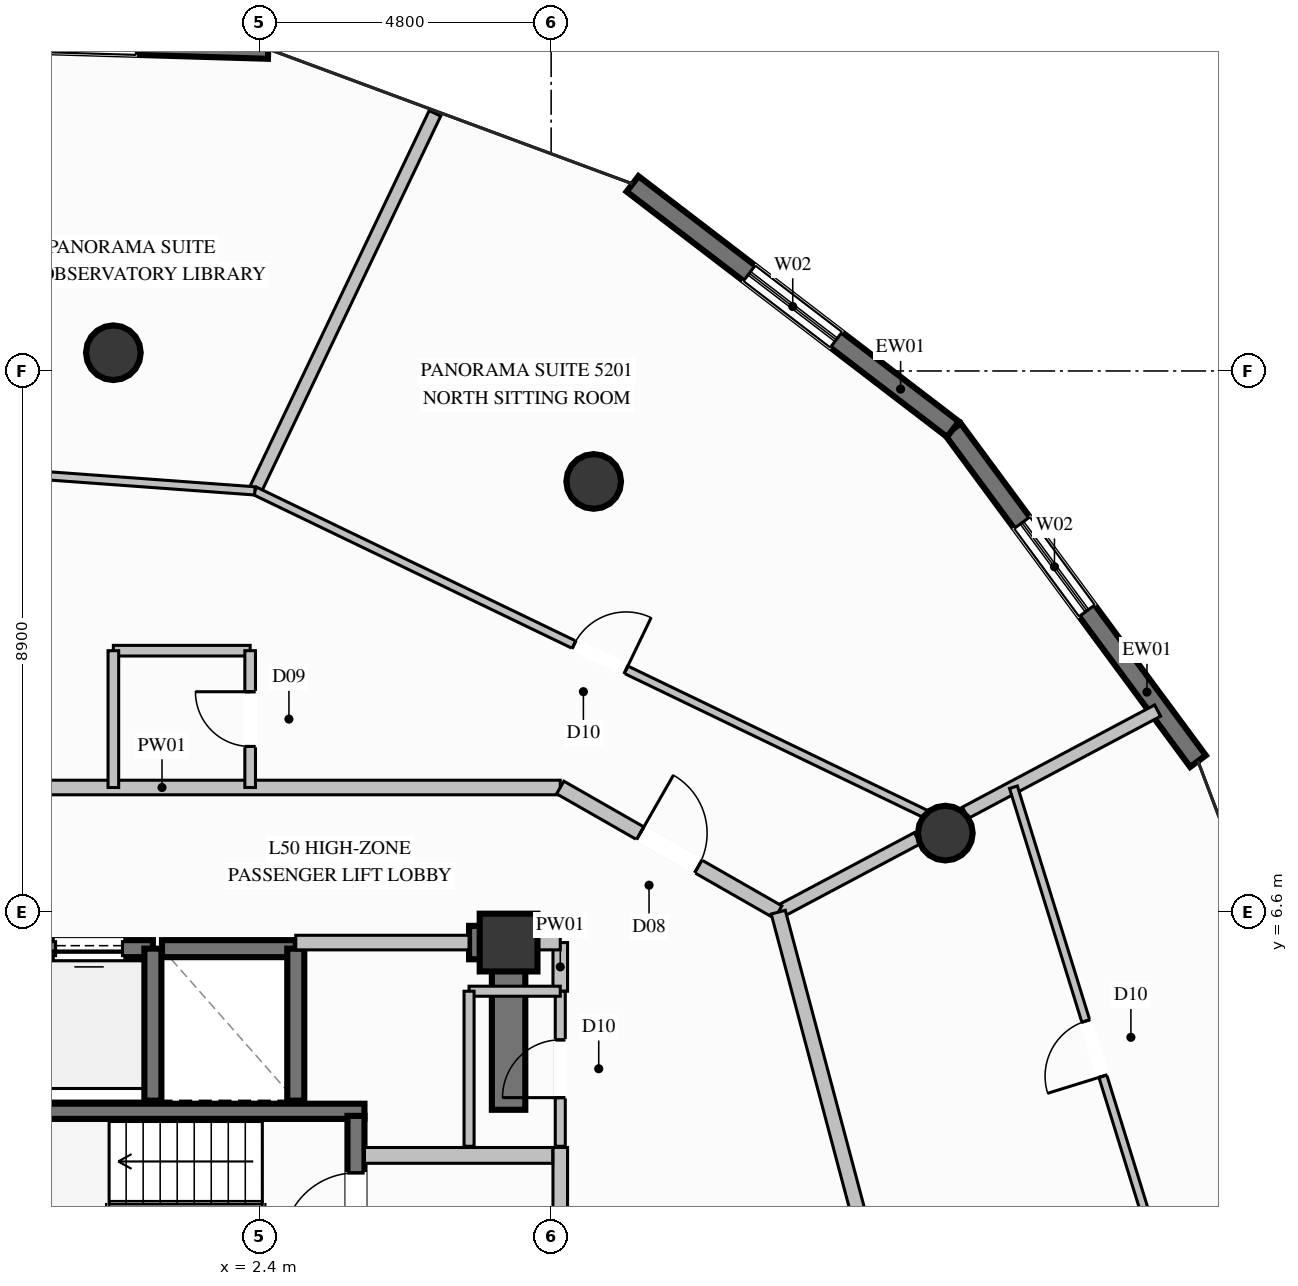
"""IFC4 building model, lengths in metres.
Left out: names, types, materials, properties, quantities, classifications, styles, units other than length and angle.
Written with IfcOpenShell. Run it as: python <this file> out.ifc"""

import sys

from ifc_helpers import new_model, si_unit, direction, frame, frame_2d, origin, origin_2d, place, context, subcontext, project, spatial, rectangle, circle, extrude, element, fill, save


model = new_model("IFC4")
c1 = context("Model", 3, precision=1e-05, world=origin(), true_north=direction((0.0, 1.0)))
c2 = subcontext(c1, "Body", "Model", "MODEL_VIEW")
j1 = project(units=[si_unit("LENGTHUNIT", "METRE"), si_unit("PLANEANGLEUNIT", "RADIAN")], contexts=[c1])
p1 = place(None, origin())
s1 = spatial("IfcSite", under=j1, at=p1, CompositionType="ELEMENT")
p2 = place(p1, origin())
s2 = spatial("IfcBuilding", under=s1, at=p2, CompositionType="ELEMENT")
p3 = place(p2, frame((0.0, 0.0, 194.8)))
s3 = spatial("IfcBuildingStorey", under=s2, at=p3, CompositionType="ELEMENT", Elevation=194.8)
p4 = place(p3, frame((6.5, 6.1, 0.0), z_axis=(0.0, 0.0, 1.0), x_axis=(1.0, 0.0, 0.0)))
e1 = element("IfcColumn", 1, at=p4, inside=s3, PredefinedType="COLUMN", context=c2, shape_type="SweptSolid", body=[
    extrude(rectangle(XDim=0.95, YDim=0.95, at=origin_2d()), origin(), (0.0, 0.0, 1.0), 3.6),
])
p5 = place(p3, frame((-4.13, 3.325, 0.0), z_axis=(0.0, 0.0, 1.0), x_axis=(1.0, 0.0, 0.0)))
e2 = element("IfcWall", 2, at=p5, inside=s3, PredefinedType="SOLIDWALL", context=c2, shape_type="SweptSolid", body=[
    extrude(rectangle(XDim=8.26, YDim=0.25, at=frame_2d((4.13, 0.0))), origin(), (0.0, 0.0, 1.0), 3.6),
])
p6 = place(p3, frame((5.85, 6.1, 0.0), z_axis=(0.0, 0.0, 1.0), x_axis=(1.0, 0.0, 0.0)))
e3 = element("IfcWall", 3, at=p6, inside=s3, PredefinedType="SHEAR", context=c2, shape_type="SweptSolid", body=[
    extrude(rectangle(XDim=0.375, YDim=0.55, at=frame_2d((0.188, 0.0))), origin(), (0.0, 0.0, 1.0), 3.6),
])
p7 = place(p3, frame((6.5, 3.35, 0.0), z_axis=(0.0, 0.0, 1.0), x_axis=(0.0, 1.0, 0.0)))
e4 = element("IfcWall", 4, at=p7, inside=s3, PredefinedType="SHEAR", context=c2, shape_type="SweptSolid", body=[
    extrude(rectangle(XDim=3.025, YDim=0.55, at=frame_2d((1.512, 0.0))), origin(), (0.0, 0.0, 1.0), 3.6),
])
for number, where, z_axis, x_axis in (
    (5, (13.683, 7.9, 0.0), (0.0, 0.0, 1.0), (1.0, 0.0, 0.0)),
    (6, (7.9, 13.683, 0.0), (0.0, 0.0, 1.0), (1.0, 0.0, 0.0)),
    (7, (0.0, 15.8, 0.0), (0.0, 0.0, 1.0), (1.0, 0.0, 0.0)),
):
    element("IfcColumn", number, at=place(p3, frame(where, z_axis=z_axis, x_axis=x_axis)), inside=s3, PredefinedType="COLUMN", context=c2, shape_type="SweptSolid", body=[
        extrude(circle(Radius=0.45, at=origin_2d()), origin(), (0.0, 0.0, 1.0), 3.6),
    ])
p8 = place(p3, frame((13.808, 14.542, 0.0), z_axis=(0.0, 0.0, 1.0), x_axis=(0.593903316121, -0.804536419996, 0.0)))
e8 = element("IfcWall", 8, at=p8, inside=s3, PredefinedType="SOLIDWALL", context=c2, shape_type="SweptSolid", body=[
    extrude(rectangle(XDim=6.785, YDim=0.32, at=frame_2d((3.393, 0.0))), origin(), (0.0, 0.0, 1.0), 3.36),
])
p9 = place(p8, frame((1.911, 0.0, 0.35)))
e9 = element("IfcOpeningElement", 9, at=p9, cuts=e8, PredefinedType="OPENING", context=c2, shape_type="SweptSolid", body=[
    extrude(rectangle(XDim=1.8, YDim=2.6, at=frame_2d((0.9, 1.3))), frame((0.0, 0.17, 0.0), z_axis=(0.0, -1.0, 0.0), x_axis=(1.0, 0.0, 0.0)), (0.0, 0.0, 1.0), 0.34),
])
p10 = place(p3, frame((8.539, 18.577, 0.0), z_axis=(0.0, 0.0, 1.0), x_axis=(0.793947286628, -0.607986600227, 0.0)))
e10 = element("IfcWall", 10, at=p10, inside=s3, PredefinedType="SOLIDWALL", context=c2, shape_type="SweptSolid", body=[
    extrude(rectangle(XDim=6.636, YDim=0.32, at=frame_2d((3.318, 0.0))), origin(), (0.0, 0.0, 1.0), 3.36),
])
p11 = place(p10, frame((2.418, 0.0, 0.35)))
e11 = element("IfcOpeningElement", 11, at=p11, cuts=e10, PredefinedType="OPENING", context=c2, shape_type="SweptSolid", body=[
    extrude(rectangle(XDim=1.8, YDim=2.6, at=frame_2d((0.9, 1.3))), frame((0.0, 0.17, 0.0), z_axis=(0.0, -1.0, 0.0), x_axis=(1.0, 0.0, 0.0)), (0.0, 0.0, 1.0), 0.34),
])
p12 = place(p3, frame((-3.582, 20.975, 0.0), z_axis=(0.0, 0.0, 1.0), x_axis=(0.999563511361, -0.029542964566, 0.0)))
e12 = element("IfcWall", 12, at=p12, inside=s3, PredefinedType="SOLIDWALL", context=c2, shape_type="SweptSolid", body=[
    extrude(rectangle(XDim=6.132, YDim=0.32, at=frame_2d((3.066, 0.0))), origin(), (0.0, 0.0, 1.0), 3.36),
])
p13 = place(p12, frame((2.166, 0.0, 0.35)))
e13 = element("IfcOpeningElement", 13, at=p13, cuts=e12, PredefinedType="OPENING", context=c2, shape_type="SweptSolid", body=[
    extrude(rectangle(XDim=1.8, YDim=2.6, at=frame_2d((0.9, 1.3))), frame((0.0, 0.17, 0.0), z_axis=(0.0, -1.0, 0.0), x_axis=(1.0, 0.0, 0.0)), (0.0, 0.0, 1.0), 0.34),
])
p14 = place(p3, frame((0.65, 6.0, 0.0), z_axis=(0.0, 0.0, 1.0), x_axis=(-1.0, 0.0, 0.0)))
e14 = element("IfcWall", 14, at=p14, inside=s3, PredefinedType="SOLIDWALL", context=c2, shape_type="SweptSolid", body=[
    extrude(rectangle(XDim=2.1, YDim=0.28, at=frame_2d((1.05, 0.0))), origin(), (0.0, 0.0, 1.0), 3.36),
])
p15 = place(p14, frame((0.5, 0.0, 0.0)))
e15 = element("IfcOpeningElement", 15, at=p15, cuts=e14, PredefinedType="OPENING", context=c2, shape_type="SweptSolid", body=[
    extrude(rectangle(XDim=1.1, YDim=2.2, at=frame_2d((0.55, 1.1))), frame((0.0, 0.15, 0.0), z_axis=(0.0, -1.0, 0.0), x_axis=(1.0, 0.0, 0.0)), (0.0, 0.0, 1.0), 0.3),
])
p16 = place(p3, frame((0.65, 3.5, 0.0), z_axis=(0.0, 0.0, 1.0), x_axis=(0.0, 1.0, 0.0)))
e16 = element("IfcWall", 16, at=p16, inside=s3, PredefinedType="SOLIDWALL", context=c2, shape_type="SweptSolid", body=[
    extrude(rectangle(XDim=2.5, YDim=0.28, at=frame_2d((1.25, 0.0))), origin(), (0.0, 0.0, 1.0), 3.36),
])
p17 = place(p3, frame((3.0, 6.0, 0.0), z_axis=(0.0, 0.0, 1.0), x_axis=(-1.0, 0.0, 0.0)))
e17 = element("IfcWall", 17, at=p17, inside=s3, PredefinedType="SOLIDWALL", context=c2, shape_type="SweptSolid", body=[
    extrude(rectangle(XDim=2.2, YDim=0.28, at=frame_2d((1.1, 0.0))), origin(), (0.0, 0.0, 1.0), 3.36),
])
p18 = place(p3, frame((3.0, 3.5, 0.0), z_axis=(0.0, 0.0, 1.0), x_axis=(0.0, 1.0, 0.0)))
e18 = element("IfcWall", 18, at=p18, inside=s3, PredefinedType="SOLIDWALL", context=c2, shape_type="SweptSolid", body=[
    extrude(rectangle(XDim=2.5, YDim=0.28, at=frame_2d((1.25, 0.0))), origin(), (0.0, 0.0, 1.0), 3.36),
])
p19 = place(p3, frame((3.99, -2.21, 0.0), z_axis=(0.0, 0.0, 1.0), x_axis=(0.0, 1.0, 0.0)))
e19 = element("IfcWall", 19, at=p19, inside=s3, PredefinedType="SOLIDWALL", context=c2, shape_type="SweptSolid", body=[
    extrude(rectangle(XDim=5.46, YDim=0.28, at=frame_2d((2.73, 0.0))), origin(), (0.0, 0.0, 1.0), 3.36),
])
p20 = place(p19, frame((3.323, 0.0, 0.0)))
e20 = element("IfcOpeningElement", 20, at=p20, cuts=e19, PredefinedType="OPENING", context=c2, shape_type="SweptSolid", body=[
    extrude(rectangle(XDim=1.2, YDim=2.2, at=frame_2d((0.6, 1.1))), frame((0.0, 0.15, 0.0), z_axis=(0.0, -1.0, 0.0), x_axis=(1.0, 0.0, 0.0)), (0.0, 0.0, 1.0), 0.3),
])
p21 = place(p3, frame((7.35, -2.34, 0.0), z_axis=(0.0, 0.0, 1.0), x_axis=(0.0, 1.0, 0.0)))
e21 = element("IfcWall", 21, at=p21, inside=s3, PredefinedType="PARTITIONING", context=c2, shape_type="SweptSolid", body=[
    extrude(rectangle(XDim=5.07, YDim=0.24, at=frame_2d((2.535, 0.0))), origin(), (0.0, 0.0, 1.0), 2.445),
])
p22 = place(p21, frame((2.548, 0.0, 0.0)))
e22 = element("IfcOpeningElement", 22, at=p22, cuts=e21, PredefinedType="OPENING", context=c2, shape_type="SweptSolid", body=[
    extrude(rectangle(XDim=1.15, YDim=2.2, at=frame_2d((0.575, 1.1))), frame((0.0, 0.13, 0.0), z_axis=(0.0, -1.0, 0.0), x_axis=(1.0, 0.0, 0.0)), (0.0, 0.0, 1.0), 0.26),
])
p23 = place(p3, frame((4.13, 2.6, 0.0), z_axis=(0.0, 0.0, 1.0), x_axis=(1.0, 0.0, 0.0)))
e23 = element("IfcWall", 23, at=p23, inside=s3, PredefinedType="PARTITIONING", context=c2, shape_type="SweptSolid", body=[
    extrude(rectangle(XDim=3.095, YDim=0.26, at=frame_2d((1.548, 0.0))), origin(), (0.0, 0.0, 1.0), 3.36),
])
p24 = place(p3, frame((-5.75, 8.65, 0.0), z_axis=(0.0, 0.0, 1.0), x_axis=(1.0, 0.0, 0.0)))
e24 = element("IfcWall", 24, at=p24, inside=s3, PredefinedType="PARTITIONING", context=c2, shape_type="SweptSolid", body=[
    extrude(rectangle(XDim=13.1, YDim=0.24, at=frame_2d((6.55, 0.0))), origin(), (0.0, 0.0, 1.0), 3.36),
])
p25 = place(p3, frame((3.0, 6.1, 0.0), z_axis=(0.0, 0.0, 1.0), x_axis=(1.0, 0.0, 0.0)))
e25 = element("IfcWall", 25, at=p25, inside=s3, PredefinedType="PARTITIONING", context=c2, shape_type="SweptSolid", body=[
    extrude(rectangle(XDim=2.85, YDim=0.24, at=frame_2d((1.425, 0.0))), origin(), (0.0, 0.0, 1.0), 2.445),
])
p26 = place(p3, frame((7.35, 5.3, 0.0), z_axis=(0.0, 0.0, 1.0), x_axis=(0.0, 1.0, 0.0)))
e26 = element("IfcWall", 26, at=p26, inside=s3, PredefinedType="PARTITIONING", context=c2, shape_type="SweptSolid", body=[
    extrude(rectangle(XDim=0.8, YDim=0.24, at=frame_2d((0.4, 0.0))), origin(), (0.0, 0.0, 1.0), 2.445),
])
p27 = place(p3, frame((6.5, 6.1, 0.0), z_axis=(0.0, 0.0, 1.0), x_axis=(1.0, 0.0, 0.0)))
e27 = element("IfcWall", 27, at=p27, inside=s3, PredefinedType="PARTITIONING", context=c2, shape_type="SweptSolid", body=[
    extrude(rectangle(XDim=0.85, YDim=0.24, at=frame_2d((0.425, 0.0))), origin(), (0.0, 0.0, 1.0), 2.801),
])
p28 = place(p3, frame((7.35, 2.75, 0.0), z_axis=(0.0, 0.0, 1.0), x_axis=(0.0, 1.0, 0.0)))
e28 = element("IfcWall", 28, at=p28, inside=s3, PredefinedType="PARTITIONING", context=c2, shape_type="SweptSolid", body=[
    extrude(rectangle(XDim=2.55, YDim=0.165, at=frame_2d((1.275, 0.0))), origin(), (0.0, 0.0, 1.0), 3.36),
])
p29 = place(p28, frame((0.8, 0.0, 0.0)))
e29 = element("IfcOpeningElement", 29, at=p29, cuts=e28, PredefinedType="OPENING", context=c2, shape_type="SweptSolid", body=[
    extrude(rectangle(XDim=0.95, YDim=2.1, at=frame_2d((0.475, 1.05))), frame((0.0, 0.093, 0.0), z_axis=(0.0, -1.0, 0.0), x_axis=(1.0, 0.0, 0.0)), (0.0, 0.0, 1.0), 0.185),
])
p30 = place(p3, frame((7.35, 5.3, 0.0), z_axis=(0.0, 0.0, 1.0), x_axis=(-1.0, 0.0, 0.0)))
e30 = element("IfcWall", 30, at=p30, inside=s3, PredefinedType="PARTITIONING", context=c2, shape_type="SweptSolid", body=[
    extrude(rectangle(XDim=1.5, YDim=0.165, at=frame_2d((0.75, 0.0))), origin(), (0.0, 0.0, 1.0), 2.445),
])
p31 = place(p3, frame((5.85, 5.3, 0.0), z_axis=(0.0, 0.0, 1.0), x_axis=(0.0, -1.0, 0.0)))
e31 = element("IfcWall", 31, at=p31, inside=s3, PredefinedType="PARTITIONING", context=c2, shape_type="SweptSolid", body=[
    extrude(rectangle(XDim=2.55, YDim=0.165, at=frame_2d((1.275, 0.0))), origin(), (0.0, 0.0, 1.0), 2.445),
])
p32 = place(p3, frame((10.935, 6.6, 0.0), z_axis=(0.0, 0.0, 1.0), x_axis=(0.883041221412, 0.469295430711, 0.0)))
e32 = element("IfcWall", 32, at=p32, inside=s3, PredefinedType="PARTITIONING", context=c2, shape_type="SweptSolid", body=[
    extrude(rectangle(XDim=2.589, YDim=0.21, at=frame_2d((1.294, 0.0))), origin(), (0.0, 0.0, 1.0), 2.801),
])
p33 = place(p3, frame((14.012, 8.235, 0.0), z_axis=(0.0, 0.0, 1.0), x_axis=(0.883108656971, 0.469168519813, 0.0)))
e33 = element("IfcWall", 33, at=p33, inside=s3, PredefinedType="PARTITIONING", context=c2, shape_type="SweptSolid", body=[
    extrude(rectangle(XDim=3.581, YDim=0.21, at=frame_2d((1.79, 0.0))), origin(), (0.0, 0.0, 1.0), 3.36),
])
for number, where, z_axis, x_axis in (
    (34, (0.0, 10.9, 0.0), (0.0, 0.0, 1.0), (1.0, 0.0, 0.0)),
    (35, (0.0, 10.9, 0.0), (0.0, 0.0, 1.0), (0.0, -1.0, 0.0)),
):
    element("IfcWall", number, at=place(p3, frame(where, z_axis=z_axis, x_axis=x_axis)), inside=s3, PredefinedType="PLUMBINGWALL", context=c2, shape_type="SweptSolid", body=[
        extrude(rectangle(XDim=2.25, YDim=0.175, at=frame_2d((1.125, 0.0))), origin(), (0.0, 0.0, 1.0), 3.36),
    ])
p34 = place(p3, frame((2.25, 8.65, 0.0), z_axis=(0.0, 0.0, 1.0), x_axis=(0.0, 1.0, 0.0)))
e36 = element("IfcWall", 36, at=p34, inside=s3, PredefinedType="PLUMBINGWALL", context=c2, shape_type="SweptSolid", body=[
    extrude(rectangle(XDim=2.25, YDim=0.175, at=frame_2d((1.125, 0.0))), origin(), (0.0, 0.0, 1.0), 3.36),
])
p35 = place(p34, frame((0.675, 0.0, 0.0)))
e37 = element("IfcOpeningElement", 37, at=p35, cuts=e36, PredefinedType="OPENING", context=c2, shape_type="SweptSolid", body=[
    extrude(rectangle(XDim=0.9, YDim=2.1, at=frame_2d((0.45, 1.05))), frame((0.0, 0.098, 0.0), z_axis=(0.0, -1.0, 0.0), x_axis=(1.0, 0.0, 0.0)), (0.0, 0.0, 1.0), 0.195),
])
p36 = place(p3, frame((7.35, 8.65, 0.0), z_axis=(0.0, 0.0, 1.0), x_axis=(0.868112139229, -0.496368123193, 0.0)))
e38 = element("IfcWall", 38, at=p36, inside=s3, PredefinedType="PARTITIONING", context=c2, shape_type="SweptSolid", body=[
    extrude(rectangle(XDim=4.13, YDim=0.24, at=frame_2d((2.065, 0.0))), origin(), (0.0, 0.0, 1.0), 3.36),
])
p37 = place(p36, frame((1.515, 0.0, 0.0)))
e39 = element("IfcOpeningElement", 39, at=p37, cuts=e38, PredefinedType="OPENING", context=c2, shape_type="SweptSolid", body=[
    extrude(rectangle(XDim=1.1, YDim=2.3, at=frame_2d((0.55, 1.15))), frame((0.0, 0.13, 0.0), z_axis=(0.0, -1.0, 0.0), x_axis=(1.0, 0.0, 0.0)), (0.0, 0.0, 1.0), 0.26),
])
p38 = place(p3, frame((2.327, 13.528, 0.0), z_axis=(0.0, 0.0, 1.0), x_axis=(0.430585057704, 0.902550003093, 0.0)))
e40 = element("IfcWall", 40, at=p38, inside=s3, PredefinedType="PARTITIONING", context=c2, shape_type="SweptSolid", body=[
    extrude(rectangle(XDim=6.879, YDim=0.21, at=frame_2d((3.44, 0.0))), origin(), (0.0, 0.0, 1.0), 3.36),
])
p39 = place(p3, frame((2.327, 13.528, 0.0), z_axis=(0.0, 0.0, 1.0), x_axis=(0.900917232422, -0.433990944981, 0.0)))
e41 = element("IfcWall", 41, at=p39, inside=s3, PredefinedType="PARTITIONING", context=c2, shape_type="SweptSolid", body=[
    extrude(rectangle(XDim=12.602, YDim=0.135, at=frame_2d((6.301, 0.0))), origin(), (0.0, 0.0, 1.0), 2.929),
])
p40 = place(p39, frame((5.826, 0.0, 0.0)))
e42 = element("IfcOpeningElement", 42, at=p40, cuts=e41, PredefinedType="OPENING", context=c2, shape_type="SweptSolid", body=[
    extrude(rectangle(XDim=0.95, YDim=2.1, at=frame_2d((0.475, 1.05))), frame((0.0, 0.078, 0.0), z_axis=(0.0, -1.0, 0.0), x_axis=(1.0, 0.0, 0.0)), (0.0, 0.0, 1.0), 0.155),
])
p41 = place(p3, frame((-8.263, 14.299, 0.0), z_axis=(0.0, 0.0, 1.0), x_axis=(0.997360188486, -0.072613045814, 0.0)))
e43 = element("IfcWall", 43, at=p41, inside=s3, PredefinedType="PARTITIONING", context=c2, shape_type="SweptSolid", body=[
    extrude(rectangle(XDim=10.618, YDim=0.135, at=frame_2d((5.309, 0.0))), origin(), (0.0, 0.0, 1.0), 2.929),
])
p42 = place(p41, frame((4.834, 0.0, 0.0)))
e44 = element("IfcOpeningElement", 44, at=p42, cuts=e43, PredefinedType="OPENING", context=c2, shape_type="SweptSolid", body=[
    extrude(rectangle(XDim=0.95, YDim=2.1, at=frame_2d((0.475, 1.05))), frame((0.0, 0.078, 0.0), z_axis=(0.0, -1.0, 0.0), x_axis=(1.0, 0.0, 0.0)), (0.0, 0.0, 1.0), 0.155),
])
p43 = place(p3, frame((12.65, 0.15, 0.0), z_axis=(0.0, 0.0, 1.0), x_axis=(-0.256934024047, 0.966428945804, 0.0)))
e45 = element("IfcWall", 45, at=p43, inside=s3, PredefinedType="PARTITIONING", context=c2, shape_type="SweptSolid", body=[
    extrude(rectangle(XDim=6.674, YDim=0.24, at=frame_2d((3.337, 0.0))), origin(), (0.0, 0.0, 1.0), 3.36),
])
p44 = place(p3, frame((17.463, 0.057, 0.0), z_axis=(0.0, 0.0, 1.0), x_axis=(-0.295539912375, 0.955330393211, 0.0)))
e46 = element("IfcWall", 46, at=p44, inside=s3, PredefinedType="PARTITIONING", context=c2, shape_type="SweptSolid", body=[
    extrude(rectangle(XDim=9.0, YDim=0.135, at=frame_2d((4.5, 0.0))), origin(), (0.0, 0.0, 1.0), 3.36),
])
p45 = place(p44, frame((4.025, 0.0, 0.0)))
e47 = element("IfcOpeningElement", 47, at=p45, cuts=e46, PredefinedType="OPENING", context=c2, shape_type="SweptSolid", body=[
    extrude(rectangle(XDim=0.95, YDim=2.1, at=frame_2d((0.475, 1.05))), frame((0.0, 0.078, 0.0), z_axis=(0.0, -1.0, 0.0), x_axis=(1.0, 0.0, 0.0)), (0.0, 0.0, 1.0), 0.155),
])
p46 = place(p9, origin())
e48 = element("IfcWindow", 48, at=p46, inside=s3, PartitioningType="SINGLE_PANEL", PredefinedType="WINDOW", context=c2, shape_type="SweptSolid", body=[
    extrude(rectangle(XDim=1.8, YDim=2.6, at=frame_2d((0.9, 1.3))), frame((0.0, 0.03, 0.0), z_axis=(0.0, -1.0, 0.0), x_axis=(1.0, 0.0, 0.0)), (0.0, 0.0, 1.0), 0.06),
])
fill(e9, e48)
p47 = place(p11, origin())
e49 = element("IfcWindow", 49, at=p47, inside=s3, PartitioningType="SINGLE_PANEL", PredefinedType="WINDOW", context=c2, shape_type="SweptSolid", body=[
    extrude(rectangle(XDim=1.8, YDim=2.6, at=frame_2d((0.9, 1.3))), frame((0.0, 0.03, 0.0), z_axis=(0.0, -1.0, 0.0), x_axis=(1.0, 0.0, 0.0)), (0.0, 0.0, 1.0), 0.06),
])
fill(e11, e49)
p48 = place(p15, origin())
e50 = element("IfcDoor", 50, at=p48, inside=s3, OperationType="SLIDING_TO_LEFT", PredefinedType="DOOR", context=c2, shape_type="SweptSolid", body=[
    extrude(rectangle(XDim=1.1, YDim=2.2, at=frame_2d((0.55, 1.1))), frame((0.0, 0.025, 0.0), z_axis=(0.0, -1.0, 0.0), x_axis=(1.0, 0.0, 0.0)), (0.0, 0.0, 1.0), 0.05),
])
fill(e15, e50)
p49 = place(p20, origin())
e51 = element("IfcDoor", 51, at=p49, inside=s3, OperationType="SINGLE_SWING_LEFT", PredefinedType="DOOR", context=c2, shape_type="SweptSolid", body=[
    extrude(rectangle(XDim=1.2, YDim=2.2, at=frame_2d((0.6, 1.1))), frame((0.0, 0.025, 0.0), z_axis=(0.0, -1.0, 0.0), x_axis=(1.0, 0.0, 0.0)), (0.0, 0.0, 1.0), 0.05),
])
fill(e20, e51)
p50 = place(p29, origin())
e52 = element("IfcDoor", 52, at=p50, inside=s3, OperationType="SINGLE_SWING_LEFT", PredefinedType="DOOR", context=c2, shape_type="SweptSolid", body=[
    extrude(rectangle(XDim=0.95, YDim=2.1, at=frame_2d((0.475, 1.05))), frame((0.0, 0.025, 0.0), z_axis=(0.0, -1.0, 0.0), x_axis=(1.0, 0.0, 0.0)), (0.0, 0.0, 1.0), 0.05),
])
fill(e29, e52)
p51 = place(p35, origin())
e53 = element("IfcDoor", 53, at=p51, inside=s3, OperationType="SINGLE_SWING_RIGHT", PredefinedType="DOOR", context=c2, shape_type="SweptSolid", body=[
    extrude(rectangle(XDim=0.9, YDim=2.1, at=frame_2d((0.45, 1.05))), frame((0.0, 0.025, 0.0), z_axis=(0.0, -1.0, 0.0), x_axis=(1.0, 0.0, 0.0)), (0.0, 0.0, 1.0), 0.05),
])
fill(e37, e53)
p52 = place(p37, origin())
e54 = element("IfcDoor", 54, at=p52, inside=s3, OperationType="SINGLE_SWING_LEFT", PredefinedType="DOOR", context=c2, shape_type="SweptSolid", body=[
    extrude(rectangle(XDim=1.1, YDim=2.3, at=frame_2d((0.55, 1.15))), frame((0.0, 0.025, 0.0), z_axis=(0.0, -1.0, 0.0), x_axis=(1.0, 0.0, 0.0)), (0.0, 0.0, 1.0), 0.05),
])
fill(e39, e54)
p53 = place(p40, origin())
e55 = element("IfcDoor", 55, at=p53, inside=s3, OperationType="SINGLE_SWING_RIGHT", PredefinedType="DOOR", context=c2, shape_type="SweptSolid", body=[
    extrude(rectangle(XDim=0.95, YDim=2.1, at=frame_2d((0.475, 1.05))), frame((0.0, 0.025, 0.0), z_axis=(0.0, -1.0, 0.0), x_axis=(1.0, 0.0, 0.0)), (0.0, 0.0, 1.0), 0.05),
])
fill(e42, e55)
p54 = place(p45, origin())
e56 = element("IfcDoor", 56, at=p54, inside=s3, OperationType="SINGLE_SWING_LEFT", PredefinedType="DOOR", context=c2, shape_type="SweptSolid", body=[
    extrude(rectangle(XDim=0.95, YDim=2.1, at=frame_2d((0.475, 1.05))), frame((0.0, 0.025, 0.0), z_axis=(0.0, -1.0, 0.0), x_axis=(1.0, 0.0, 0.0)), (0.0, 0.0, 1.0), 0.05),
])
fill(e47, e56)
save(model, sys.argv[1])
